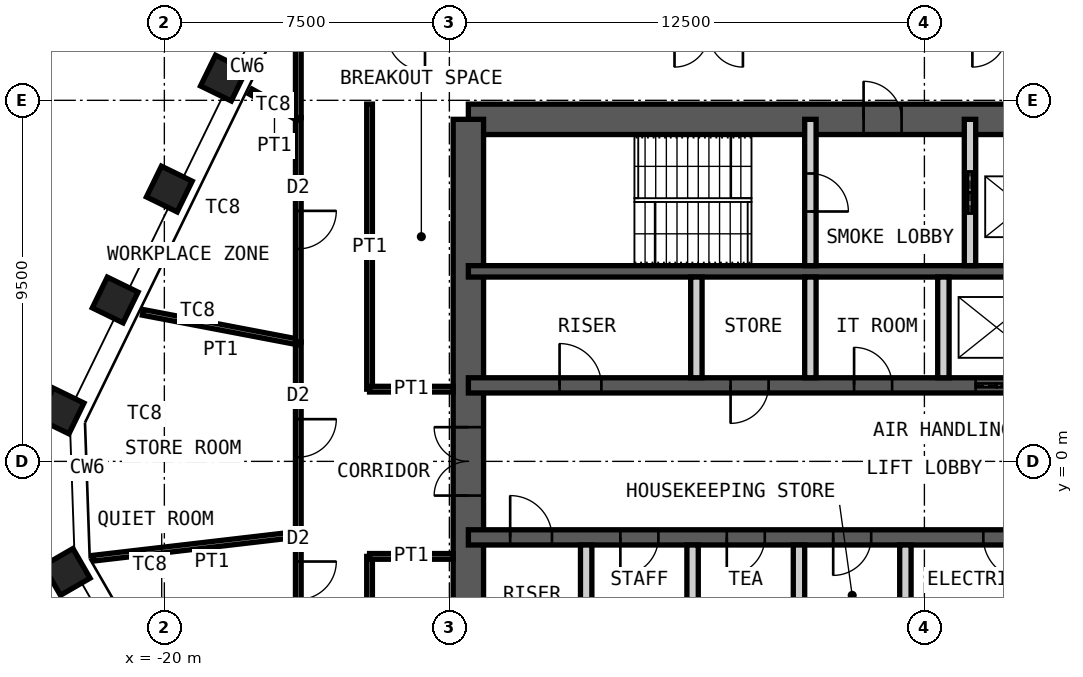
"""IFC4 building model, lengths in metres.
Left out: names, types, materials, properties, quantities, classifications, styles, units other than length and angle.
Written with IfcOpenShell. Run it as: python <this file> out.ifc"""

import sys

from ifc_helpers import new_model, si_unit, direction, frame, frame_2d, origin, origin_2d, place, context, subcontext, project, spatial, rectangle, hollow_rectangle, extrude, element, fill, save


model = new_model("IFC4")
c1 = context("Model", 3, precision=1e-05, world=origin(), true_north=direction((0.0, 1.0)))
c2 = subcontext(c1, "Body", "Model", "MODEL_VIEW")
j1 = project(units=[si_unit("LENGTHUNIT", "METRE"), si_unit("PLANEANGLEUNIT", "RADIAN")], contexts=[c1])
p1 = place(None, origin())
s1 = spatial("IfcSite", under=j1, at=p1, CompositionType="ELEMENT")
p2 = place(p1, origin())
s2 = spatial("IfcBuilding", under=s1, at=p2, CompositionType="ELEMENT")
p3 = place(p2, frame((0.0, 0.0, 325.0)))
s3 = spatial("IfcBuildingStorey", under=s2, at=p3, CompositionType="ELEMENT", Elevation=325.0)
for number, where, z_axis, x_axis in (
    (1, (-22.57, -2.908, 0.0), (0.0, 0.0, 1.0), (0.5, -0.866, 0.0)),
    (2, (-22.717, 1.327, 0.0), (0.0, 0.0, 1.0), (-0.438, -0.899, 0.0)),
    (3, (-21.293, 4.246, 0.0), (0.0, 0.0, 1.0), (-0.438, -0.899, 0.0)),
    (4, (-19.87, 7.166, 0.0), (0.0, 0.0, 1.0), (-0.438, -0.899, 0.0)),
    (5, (-18.446, 10.085, 0.0), (0.0, 0.0, 1.0), (-0.438, -0.899, 0.0)),
):
    element("IfcColumn", number, at=place(p3, frame(where, z_axis=z_axis, x_axis=x_axis)), inside=s3, PredefinedType="COLUMN", context=c2, shape_type="SweptSolid", body=[
        extrude(hollow_rectangle(XDim=0.9, YDim=0.9, WallThickness=0.05, at=origin_2d()), origin(), (0.0, 0.0, 1.0), 4.2),
    ])
p4 = place(p3, frame((-12.0, 9.0, 0.0), z_axis=(0.0, 0.0, 1.0), x_axis=(1.0, 0.0, 0.0)))
e6 = element("IfcWall", 6, at=p4, inside=s3, PredefinedType="SHEAR", context=c2, shape_type="SweptSolid", body=[
    extrude(rectangle(XDim=24.0, YDim=0.8, at=frame_2d((12.0, 0.0))), origin(), (0.0, 0.0, 1.0), 4.2),
])
p5 = place(p4, frame((10.4, 0.0, 0.0)))
e7 = element("IfcOpeningElement", 7, at=p5, cuts=e6, PredefinedType="OPENING", context=c2, shape_type="SweptSolid", body=[
    extrude(rectangle(XDim=1.0, YDim=2.1, at=frame_2d((0.5, 1.05))), frame((0.0, 0.41, 0.0), z_axis=(0.0, -1.0, 0.0), x_axis=(1.0, 0.0, 0.0)), (0.0, 0.0, 1.0), 0.82),
])
p6 = place(p4, frame((17.6, 0.0, 0.0)))
e8 = element("IfcOpeningElement", 8, at=p6, cuts=e6, PredefinedType="OPENING", context=c2, shape_type="SweptSolid", body=[
    extrude(rectangle(XDim=0.9, YDim=2.1, at=frame_2d((0.45, 1.05))), frame((0.0, 0.41, 0.0), z_axis=(0.0, -1.0, 0.0), x_axis=(1.0, 0.0, 0.0)), (0.0, 0.0, 1.0), 0.82),
])
p7 = place(p4, frame((21.9, 0.0, 0.0)))
e9 = element("IfcOpeningElement", 9, at=p7, cuts=e6, PredefinedType="OPENING", context=c2, shape_type="SweptSolid", body=[
    extrude(rectangle(XDim=0.9, YDim=2.1, at=frame_2d((0.45, 1.05))), frame((0.0, 0.41, 0.0), z_axis=(0.0, -1.0, 0.0), x_axis=(1.0, 0.0, 0.0)), (0.0, 0.0, 1.0), 0.82),
])
p8 = place(p3, frame((-12.0, -9.0, 0.0), z_axis=(0.0, 0.0, 1.0), x_axis=(0.0, 1.0, 0.0)))
e10 = element("IfcWall", 10, at=p8, inside=s3, PredefinedType="SHEAR", context=c2, shape_type="SweptSolid", body=[
    extrude(rectangle(XDim=18.0, YDim=0.8, at=frame_2d((9.0, 0.0))), origin(), (0.0, 0.0, 1.0), 4.2),
])
p9 = place(p8, frame((8.1, 0.0, 0.0)))
e11 = element("IfcOpeningElement", 11, at=p9, cuts=e10, PredefinedType="OPENING", context=c2, shape_type="SweptSolid", body=[
    extrude(rectangle(XDim=1.8, YDim=2.1, at=frame_2d((0.9, 1.05))), frame((0.0, 0.41, 0.0), z_axis=(0.0, -1.0, 0.0), x_axis=(1.0, 0.0, 0.0)), (0.0, 0.0, 1.0), 0.82),
])
p10 = place(p3, frame((-12.0, 5.0, 0.0), z_axis=(0.0, 0.0, 1.0), x_axis=(1.0, 0.0, 0.0)))
e12 = element("IfcWall", 12, at=p10, inside=s3, PredefinedType="SHEAR", context=c2, shape_type="SweptSolid", body=[
    extrude(rectangle(XDim=24.0, YDim=0.3, at=frame_2d((12.0, 0.0))), origin(), (0.0, 0.0, 1.0), 4.2),
])
p11 = place(p3, frame((-12.0, 2.0, 0.0), z_axis=(0.0, 0.0, 1.0), x_axis=(1.0, 0.0, 0.0)))
e13 = element("IfcWall", 13, at=p11, inside=s3, PredefinedType="SHEAR", context=c2, shape_type="SweptSolid", body=[
    extrude(rectangle(XDim=24.0, YDim=0.4, at=frame_2d((12.0, 0.0))), origin(), (0.0, 0.0, 1.0), 4.2),
])
p12 = place(p11, frame((2.4, 0.0, 0.0)))
e14 = element("IfcOpeningElement", 14, at=p12, cuts=e13, PredefinedType="OPENING", context=c2, shape_type="SweptSolid", body=[
    extrude(rectangle(XDim=1.1, YDim=2.1, at=frame_2d((0.55, 1.05))), frame((0.0, 0.21, 0.0), z_axis=(0.0, -1.0, 0.0), x_axis=(1.0, 0.0, 0.0)), (0.0, 0.0, 1.0), 0.42),
])
p13 = place(p11, frame((22.0, 0.0, 0.0)))
e15 = element("IfcOpeningElement", 15, at=p13, cuts=e13, PredefinedType="OPENING", context=c2, shape_type="SweptSolid", body=[
    extrude(rectangle(XDim=1.1, YDim=2.1, at=frame_2d((0.55, 1.05))), frame((0.0, 0.21, 0.0), z_axis=(0.0, -1.0, 0.0), x_axis=(1.0, 0.0, 0.0)), (0.0, 0.0, 1.0), 0.42),
])
p14 = place(p11, frame((10.15, 0.0, 0.0)))
e16 = element("IfcOpeningElement", 16, at=p14, cuts=e13, PredefinedType="OPENING", context=c2, shape_type="SweptSolid", body=[
    extrude(rectangle(XDim=1.0, YDim=2.1, at=frame_2d((0.5, 1.05))), frame((0.0, 0.21, 0.0), z_axis=(0.0, -1.0, 0.0), x_axis=(1.0, 0.0, 0.0)), (0.0, 0.0, 1.0), 0.42),
])
p15 = place(p11, frame((6.9, 0.0, 0.0)))
e17 = element("IfcOpeningElement", 17, at=p15, cuts=e13, PredefinedType="OPENING", context=c2, shape_type="SweptSolid", body=[
    extrude(rectangle(XDim=1.0, YDim=2.1, at=frame_2d((0.5, 1.05))), frame((0.0, 0.21, 0.0), z_axis=(0.0, -1.0, 0.0), x_axis=(1.0, 0.0, 0.0)), (0.0, 0.0, 1.0), 0.42),
])
p16 = place(p11, frame((13.35, 0.0, 0.0)))
e18 = element("IfcOpeningElement", 18, at=p16, cuts=e13, PredefinedType="OPENING", context=c2, shape_type="SweptSolid", body=[
    extrude(rectangle(XDim=1.1, YDim=2.4, at=frame_2d((0.55, 1.2))), frame((0.0, 0.21, 0.0), z_axis=(0.0, -1.0, 0.0), x_axis=(1.0, 0.0, 0.0)), (0.0, 0.0, 1.0), 0.42),
])
p17 = place(p11, frame((16.15, 0.0, 0.0)))
e19 = element("IfcOpeningElement", 19, at=p17, cuts=e13, PredefinedType="OPENING", context=c2, shape_type="SweptSolid", body=[
    extrude(rectangle(XDim=1.1, YDim=2.4, at=frame_2d((0.55, 1.2))), frame((0.0, 0.21, 0.0), z_axis=(0.0, -1.0, 0.0), x_axis=(1.0, 0.0, 0.0)), (0.0, 0.0, 1.0), 0.42),
])
p18 = place(p11, frame((19.0, 0.0, 0.0)))
e20 = element("IfcOpeningElement", 20, at=p18, cuts=e13, PredefinedType="OPENING", context=c2, shape_type="SweptSolid", body=[
    extrude(rectangle(XDim=1.0, YDim=2.1, at=frame_2d((0.5, 1.05))), frame((0.0, 0.21, 0.0), z_axis=(0.0, -1.0, 0.0), x_axis=(1.0, 0.0, 0.0)), (0.0, 0.0, 1.0), 0.42),
])
p19 = place(p3, frame((-12.0, -2.0, 0.0), z_axis=(0.0, 0.0, 1.0), x_axis=(1.0, 0.0, 0.0)))
e21 = element("IfcWall", 21, at=p19, inside=s3, PredefinedType="SHEAR", context=c2, shape_type="SweptSolid", body=[
    extrude(rectangle(XDim=24.0, YDim=0.4, at=frame_2d((12.0, 0.0))), origin(), (0.0, 0.0, 1.0), 4.2),
])
p20 = place(p19, frame((1.1, 0.0, 0.0)))
e22 = element("IfcOpeningElement", 22, at=p20, cuts=e21, PredefinedType="OPENING", context=c2, shape_type="SweptSolid", body=[
    extrude(rectangle(XDim=1.1, YDim=2.1, at=frame_2d((0.55, 1.05))), frame((0.0, 0.21, 0.0), z_axis=(0.0, -1.0, 0.0), x_axis=(1.0, 0.0, 0.0)), (0.0, 0.0, 1.0), 0.42),
])
p21 = place(p19, frame((13.55, 0.0, 0.0)))
e23 = element("IfcOpeningElement", 23, at=p21, cuts=e21, PredefinedType="OPENING", context=c2, shape_type="SweptSolid", body=[
    extrude(rectangle(XDim=1.1, YDim=2.1, at=frame_2d((0.55, 1.05))), frame((0.0, 0.21, 0.0), z_axis=(0.0, -1.0, 0.0), x_axis=(1.0, 0.0, 0.0)), (0.0, 0.0, 1.0), 0.42),
])
p22 = place(p19, frame((20.7, 0.0, 0.0)))
e24 = element("IfcOpeningElement", 24, at=p22, cuts=e21, PredefinedType="OPENING", context=c2, shape_type="SweptSolid", body=[
    extrude(rectangle(XDim=1.1, YDim=2.1, at=frame_2d((0.55, 1.05))), frame((0.0, 0.21, 0.0), z_axis=(0.0, -1.0, 0.0), x_axis=(1.0, 0.0, 0.0)), (0.0, 0.0, 1.0), 0.42),
])
p23 = place(p19, frame((4.0, 0.0, 0.0)))
e25 = element("IfcOpeningElement", 25, at=p23, cuts=e21, PredefinedType="OPENING", context=c2, shape_type="SweptSolid", body=[
    extrude(rectangle(XDim=1.0, YDim=2.1, at=frame_2d((0.5, 1.05))), frame((0.0, 0.21, 0.0), z_axis=(0.0, -1.0, 0.0), x_axis=(1.0, 0.0, 0.0)), (0.0, 0.0, 1.0), 0.42),
])
p24 = place(p19, frame((6.8, 0.0, 0.0)))
e26 = element("IfcOpeningElement", 26, at=p24, cuts=e21, PredefinedType="OPENING", context=c2, shape_type="SweptSolid", body=[
    extrude(rectangle(XDim=1.0, YDim=2.1, at=frame_2d((0.5, 1.05))), frame((0.0, 0.21, 0.0), z_axis=(0.0, -1.0, 0.0), x_axis=(1.0, 0.0, 0.0)), (0.0, 0.0, 1.0), 0.42),
])
p25 = place(p19, frame((9.6, 0.0, 0.0)))
e27 = element("IfcOpeningElement", 27, at=p25, cuts=e21, PredefinedType="OPENING", context=c2, shape_type="SweptSolid", body=[
    extrude(rectangle(XDim=1.0, YDim=2.1, at=frame_2d((0.5, 1.05))), frame((0.0, 0.21, 0.0), z_axis=(0.0, -1.0, 0.0), x_axis=(1.0, 0.0, 0.0)), (0.0, 0.0, 1.0), 0.42),
])
p26 = place(p3, frame((-3.0, 5.15, 0.0), z_axis=(0.0, 0.0, 1.0), x_axis=(0.0, 1.0, 0.0)))
e28 = element("IfcWall", 28, at=p26, inside=s3, PredefinedType="PARTITIONING", context=c2, shape_type="SweptSolid", body=[
    extrude(rectangle(XDim=3.85, YDim=0.3, at=frame_2d((1.925, 0.0))), origin(), (0.0, 0.0, 1.0), 3.98),
])
p27 = place(p26, frame((1.425, 0.0, 0.0)))
e29 = element("IfcOpeningElement", 29, at=p27, cuts=e28, PredefinedType="OPENING", context=c2, shape_type="SweptSolid", body=[
    extrude(rectangle(XDim=1.0, YDim=2.1, at=frame_2d((0.5, 1.05))), frame((0.0, 0.16, 0.0), z_axis=(0.0, -1.0, 0.0), x_axis=(1.0, 0.0, 0.0)), (0.0, 0.0, 1.0), 0.32),
])
p28 = place(p3, frame((1.2, 5.15, 0.0), z_axis=(0.0, 0.0, 1.0), x_axis=(0.0, 1.0, 0.0)))
e30 = element("IfcWall", 30, at=p28, inside=s3, PredefinedType="PARTITIONING", context=c2, shape_type="SweptSolid", body=[
    extrude(rectangle(XDim=3.85, YDim=0.3, at=frame_2d((1.925, 0.0))), origin(), (0.0, 0.0, 1.0), 3.98),
])
p29 = place(p28, frame((1.375, 0.0, 0.0)))
e31 = element("IfcOpeningElement", 31, at=p29, cuts=e30, PredefinedType="OPENING", context=c2, shape_type="SweptSolid", body=[
    extrude(rectangle(XDim=1.1, YDim=2.4, at=frame_2d((0.55, 1.2))), frame((0.0, 0.16, 0.0), z_axis=(0.0, -1.0, 0.0), x_axis=(1.0, 0.0, 0.0)), (0.0, 0.0, 1.0), 0.32),
])
for number, where, z_axis, x_axis in (
    (32, (-6.0, 2.2, 0.0), (0.0, 0.0, 1.0), (0.0, 1.0, 0.0)),
    (33, (-3.0, 2.2, 0.0), (0.0, 0.0, 1.0), (0.0, 1.0, 0.0)),
    (34, (0.5, 2.2, 0.0), (0.0, 0.0, 1.0), (0.0, 1.0, 0.0)),
    (35, (-8.9, -4.85, 0.0), (0.0, 0.0, 1.0), (0.0, 1.0, 0.0)),
    (36, (-6.1, -4.85, 0.0), (0.0, 0.0, 1.0), (0.0, 1.0, 0.0)),
    (37, (-3.3, -4.85, 0.0), (0.0, 0.0, 1.0), (0.0, 1.0, 0.0)),
    (38, (-0.5, -4.85, 0.0), (0.0, 0.0, 1.0), (0.0, 1.0, 0.0)),
):
    element("IfcWall", number, at=place(p3, frame(where, z_axis=z_axis, x_axis=x_axis)), inside=s3, PredefinedType="PARTITIONING", context=c2, shape_type="SweptSolid", body=[
        extrude(rectangle(XDim=2.65, YDim=0.3, at=frame_2d((1.325, 0.0))), origin(), (0.0, 0.0, 1.0), 3.98),
    ])
p30 = place(p3, frame((-16.475, -4.351, 0.0), z_axis=(0.0, 0.0, 1.0), x_axis=(0.0, 1.0, 0.0)))
e39 = element("IfcWall", 39, at=p30, inside=s3, PredefinedType="PARTITIONING", context=c2, shape_type="SweptSolid", body=[
    extrude(rectangle(XDim=2.432, YDim=0.15, at=frame_2d((1.216, 0.0))), origin(), (0.0, 0.0, 1.0), 4.03),
])
p31 = place(p30, frame((0.716, 0.0, 0.0)))
e40 = element("IfcOpeningElement", 40, at=p31, cuts=e39, PredefinedType="OPENING", context=c2, shape_type="SweptSolid", body=[
    extrude(rectangle(XDim=1.0, YDim=2.4, at=frame_2d((0.5, 1.2))), frame((0.0, 0.085, 0.0), z_axis=(0.0, -1.0, 0.0), x_axis=(1.0, 0.0, 0.0)), (0.0, 0.0, 1.0), 0.17),
])
p32 = place(p3, frame((-21.864, -2.547, 0.0), z_axis=(0.0, 0.0, 1.0), x_axis=(0.993284789299, 0.115694975458, 0.0)))
e41 = element("IfcWall", 41, at=p32, inside=s3, PredefinedType="PARTITIONING", context=c2, shape_type="SweptSolid", body=[
    extrude(rectangle(XDim=5.425, YDim=0.15, at=frame_2d((2.713, 0.0))), origin(), (0.0, 0.0, 1.0), 2.93),
])
p33 = place(p3, frame((-16.475, -1.919, 0.0), z_axis=(0.0, 0.0, 1.0), x_axis=(0.0, 1.0, 0.0)))
e42 = element("IfcWall", 42, at=p33, inside=s3, PredefinedType="PARTITIONING", context=c2, shape_type="SweptSolid", body=[
    extrude(rectangle(XDim=5.06, YDim=0.15, at=frame_2d((2.53, 0.0))), origin(), (0.0, 0.0, 1.0), 4.03),
])
p34 = place(p33, frame((2.03, 0.0, 0.0)))
e43 = element("IfcOpeningElement", 43, at=p34, cuts=e42, PredefinedType="OPENING", context=c2, shape_type="SweptSolid", body=[
    extrude(rectangle(XDim=1.0, YDim=2.4, at=frame_2d((0.5, 1.2))), frame((0.0, 0.085, 0.0), z_axis=(0.0, -1.0, 0.0), x_axis=(1.0, 0.0, 0.0)), (0.0, 0.0, 1.0), 0.17),
])
p35 = place(p3, frame((-20.566, 3.921, 0.0), z_axis=(0.0, 0.0, 1.0), x_axis=(0.982304172816, -0.187292584123, 0.0)))
e44 = element("IfcWall", 44, at=p35, inside=s3, PredefinedType="PARTITIONING", context=c2, shape_type="SweptSolid", body=[
    extrude(rectangle(XDim=4.165, YDim=0.15, at=frame_2d((2.083, 0.0))), origin(), (0.0, 0.0, 1.0), 3.33),
])
p36 = place(p3, frame((-16.475, 3.141, 0.0), z_axis=(0.0, 0.0, 1.0), x_axis=(0.0, 1.0, 0.0)))
e45 = element("IfcWall", 45, at=p36, inside=s3, PredefinedType="PARTITIONING", context=c2, shape_type="SweptSolid", body=[
    extrude(rectangle(XDim=5.901, YDim=0.15, at=frame_2d((2.95, 0.0))), origin(), (0.0, 0.0, 1.0), 4.03),
])
p37 = place(p36, frame((2.45, 0.0, 0.0)))
e46 = element("IfcOpeningElement", 46, at=p37, cuts=e45, PredefinedType="OPENING", context=c2, shape_type="SweptSolid", body=[
    extrude(rectangle(XDim=1.0, YDim=2.4, at=frame_2d((0.5, 1.2))), frame((0.0, 0.085, 0.0), z_axis=(0.0, -1.0, 0.0), x_axis=(1.0, 0.0, 0.0)), (0.0, 0.0, 1.0), 0.17),
])
p38 = place(p3, frame((-17.729, 9.73, 0.0), z_axis=(0.0, 0.0, 1.0), x_axis=(0.876633607687, -0.481158516369, 0.0)))
e47 = element("IfcWall", 47, at=p38, inside=s3, PredefinedType="PARTITIONING", context=c2, shape_type="SweptSolid", body=[
    extrude(rectangle(XDim=1.43, YDim=0.15, at=frame_2d((0.715, 0.0))), origin(), (0.0, 0.0, 1.0), 3.33),
])
p39 = place(p3, frame((-16.475, 9.042, 0.0), z_axis=(0.0, 0.0, 1.0), x_axis=(0.0, 1.0, 0.0)))
e48 = element("IfcWall", 48, at=p39, inside=s3, PredefinedType="PARTITIONING", context=c2, shape_type="SweptSolid", body=[
    extrude(rectangle(XDim=2.233, YDim=0.15, at=frame_2d((1.117, 0.0))), origin(), (0.0, 0.0, 1.0), 4.03),
])
p40 = place(p3, frame((-14.6, 1.9, 0.0), z_axis=(0.0, 0.0, 1.0), x_axis=(0.0, 1.0, 0.0)))
e49 = element("IfcWall", 49, at=p40, inside=s3, PredefinedType="PARTITIONING", context=c2, shape_type="SweptSolid", body=[
    extrude(rectangle(XDim=7.5, YDim=0.15, at=frame_2d((3.75, 0.0))), origin(), (0.0, 0.0, 1.0), 4.03),
])
p41 = place(p3, frame((-12.4, 1.9, 0.0), z_axis=(0.0, 0.0, 1.0), x_axis=(-1.0, 0.0, 0.0)))
e50 = element("IfcWall", 50, at=p41, inside=s3, PredefinedType="PARTITIONING", context=c2, shape_type="SweptSolid", body=[
    extrude(rectangle(XDim=2.2, YDim=0.15, at=frame_2d((1.1, 0.0))), origin(), (0.0, 0.0, 1.0), 3.53),
])
p42 = place(p3, frame((-14.6, -9.4, 0.0), z_axis=(0.0, 0.0, 1.0), x_axis=(0.0, 1.0, 0.0)))
e51 = element("IfcWall", 51, at=p42, inside=s3, PredefinedType="PARTITIONING", context=c2, shape_type="SweptSolid", body=[
    extrude(rectangle(XDim=6.9, YDim=0.15, at=frame_2d((3.45, 0.0))), origin(), (0.0, 0.0, 1.0), 4.03),
])
p43 = place(p3, frame((-12.4, -2.5, 0.0), z_axis=(0.0, 0.0, 1.0), x_axis=(-1.0, 0.0, 0.0)))
e52 = element("IfcWall", 52, at=p43, inside=s3, PredefinedType="PARTITIONING", context=c2, shape_type="SweptSolid", body=[
    extrude(rectangle(XDim=2.2, YDim=0.15, at=frame_2d((1.1, 0.0))), origin(), (0.0, 0.0, 1.0), 3.53),
])
p44 = place(p5, origin())
e53 = element("IfcDoor", 53, at=p44, inside=s3, OperationType="SINGLE_SWING_RIGHT", PredefinedType="DOOR", context=c2, shape_type="SweptSolid", body=[
    extrude(rectangle(XDim=1.0, YDim=2.1, at=frame_2d((0.5, 1.05))), frame((0.0, 0.025, 0.0), z_axis=(0.0, -1.0, 0.0), x_axis=(1.0, 0.0, 0.0)), (0.0, 0.0, 1.0), 0.05),
])
fill(e7, e53)
p45 = place(p27, origin())
e54 = element("IfcDoor", 54, at=p45, inside=s3, OperationType="SINGLE_SWING_LEFT", PredefinedType="DOOR", context=c2, shape_type="SweptSolid", body=[
    extrude(rectangle(XDim=1.0, YDim=2.1, at=frame_2d((0.5, 1.05))), frame((0.0, 0.025, 0.0), z_axis=(0.0, -1.0, 0.0), x_axis=(1.0, 0.0, 0.0)), (0.0, 0.0, 1.0), 0.05),
])
fill(e29, e54)
p46 = place(p12, origin())
e55 = element("IfcDoor", 55, at=p46, inside=s3, OperationType="SINGLE_SWING_RIGHT", PredefinedType="DOOR", context=c2, shape_type="SweptSolid", body=[
    extrude(rectangle(XDim=1.1, YDim=2.1, at=frame_2d((0.55, 1.05))), frame((0.0, 0.025, 0.0), z_axis=(0.0, -1.0, 0.0), x_axis=(1.0, 0.0, 0.0)), (0.0, 0.0, 1.0), 0.05),
])
fill(e14, e55)
p47 = place(p20, origin())
e56 = element("IfcDoor", 56, at=p47, inside=s3, OperationType="SINGLE_SWING_RIGHT", PredefinedType="DOOR", context=c2, shape_type="SweptSolid", body=[
    extrude(rectangle(XDim=1.1, YDim=2.1, at=frame_2d((0.55, 1.05))), frame((0.0, 0.025, 0.0), z_axis=(0.0, -1.0, 0.0), x_axis=(1.0, 0.0, 0.0)), (0.0, 0.0, 1.0), 0.05),
])
fill(e22, e56)
p48 = place(p14, origin())
e57 = element("IfcDoor", 57, at=p48, inside=s3, OperationType="SINGLE_SWING_RIGHT", PredefinedType="DOOR", context=c2, shape_type="SweptSolid", body=[
    extrude(rectangle(XDim=1.0, YDim=2.1, at=frame_2d((0.5, 1.05))), frame((0.0, 0.025, 0.0), z_axis=(0.0, -1.0, 0.0), x_axis=(1.0, 0.0, 0.0)), (0.0, 0.0, 1.0), 0.05),
])
fill(e16, e57)
p49 = place(p21, origin())
e58 = element("IfcDoor", 58, at=p49, inside=s3, OperationType="SINGLE_SWING_RIGHT", PredefinedType="DOOR", context=c2, shape_type="SweptSolid", body=[
    extrude(rectangle(XDim=1.1, YDim=2.1, at=frame_2d((0.55, 1.05))), frame((0.0, 0.025, 0.0), z_axis=(0.0, -1.0, 0.0), x_axis=(1.0, 0.0, 0.0)), (0.0, 0.0, 1.0), 0.05),
])
fill(e23, e58)
p50 = place(p9, origin())
e59 = element("IfcDoor", 59, at=p50, inside=s3, OperationType="DOUBLE_DOOR_DOUBLE_SWING", PredefinedType="DOOR", context=c2, shape_type="SweptSolid", body=[
    extrude(rectangle(XDim=1.8, YDim=2.1, at=frame_2d((0.9, 1.05))), frame((0.0, 0.025, 0.0), z_axis=(0.0, -1.0, 0.0), x_axis=(1.0, 0.0, 0.0)), (0.0, 0.0, 1.0), 0.05),
])
fill(e11, e59)
p51 = place(p29, origin())
e60 = element("IfcDoor", 60, at=p51, inside=s3, OperationType="DOUBLE_DOOR_SLIDING", PredefinedType="DOOR", context=c2, shape_type="SweptSolid", body=[
    extrude(rectangle(XDim=1.1, YDim=2.4, at=frame_2d((0.55, 1.2))), frame((0.0, 0.025, 0.0), z_axis=(0.0, -1.0, 0.0), x_axis=(1.0, 0.0, 0.0)), (0.0, 0.0, 1.0), 0.05),
])
fill(e31, e60)
p52 = place(p15, origin())
e61 = element("IfcDoor", 61, at=p52, inside=s3, OperationType="SINGLE_SWING_LEFT", PredefinedType="DOOR", context=c2, shape_type="SweptSolid", body=[
    extrude(rectangle(XDim=1.0, YDim=2.1, at=frame_2d((0.5, 1.05))), frame((0.0, 0.025, 0.0), z_axis=(0.0, -1.0, 0.0), x_axis=(1.0, 0.0, 0.0)), (0.0, 0.0, 1.0), 0.05),
])
fill(e17, e61)
p53 = place(p16, origin())
e62 = element("IfcDoor", 62, at=p53, inside=s3, OperationType="DOUBLE_DOOR_SLIDING", PredefinedType="DOOR", context=c2, shape_type="SweptSolid", body=[
    extrude(rectangle(XDim=1.1, YDim=2.4, at=frame_2d((0.55, 1.2))), frame((0.0, 0.025, 0.0), z_axis=(0.0, -1.0, 0.0), x_axis=(1.0, 0.0, 0.0)), (0.0, 0.0, 1.0), 0.05),
])
fill(e18, e62)
p54 = place(p23, origin())
e63 = element("IfcDoor", 63, at=p54, inside=s3, OperationType="SINGLE_SWING_LEFT", PredefinedType="DOOR", context=c2, shape_type="SweptSolid", body=[
    extrude(rectangle(XDim=1.0, YDim=2.1, at=frame_2d((0.5, 1.05))), frame((0.0, 0.025, 0.0), z_axis=(0.0, -1.0, 0.0), x_axis=(1.0, 0.0, 0.0)), (0.0, 0.0, 1.0), 0.05),
])
fill(e25, e63)
p55 = place(p24, origin())
e64 = element("IfcDoor", 64, at=p55, inside=s3, OperationType="SINGLE_SWING_LEFT", PredefinedType="DOOR", context=c2, shape_type="SweptSolid", body=[
    extrude(rectangle(XDim=1.0, YDim=2.1, at=frame_2d((0.5, 1.05))), frame((0.0, 0.025, 0.0), z_axis=(0.0, -1.0, 0.0), x_axis=(1.0, 0.0, 0.0)), (0.0, 0.0, 1.0), 0.05),
])
fill(e26, e64)
p56 = place(p25, origin())
e65 = element("IfcDoor", 65, at=p56, inside=s3, OperationType="SINGLE_SWING_LEFT", PredefinedType="DOOR", context=c2, shape_type="SweptSolid", body=[
    extrude(rectangle(XDim=1.0, YDim=2.1, at=frame_2d((0.5, 1.05))), frame((0.0, 0.025, 0.0), z_axis=(0.0, -1.0, 0.0), x_axis=(1.0, 0.0, 0.0)), (0.0, 0.0, 1.0), 0.05),
])
fill(e27, e65)
p57 = place(p31, origin())
e66 = element("IfcDoor", 66, at=p57, inside=s3, OperationType="SINGLE_SWING_RIGHT", PredefinedType="DOOR", context=c2, shape_type="SweptSolid", body=[
    extrude(rectangle(XDim=1.0, YDim=2.4, at=frame_2d((0.5, 1.2))), frame((0.0, 0.025, 0.0), z_axis=(0.0, -1.0, 0.0), x_axis=(1.0, 0.0, 0.0)), (0.0, 0.0, 1.0), 0.05),
])
fill(e40, e66)
p58 = place(p34, origin())
e67 = element("IfcDoor", 67, at=p58, inside=s3, OperationType="SINGLE_SWING_RIGHT", PredefinedType="DOOR", context=c2, shape_type="SweptSolid", body=[
    extrude(rectangle(XDim=1.0, YDim=2.4, at=frame_2d((0.5, 1.2))), frame((0.0, 0.025, 0.0), z_axis=(0.0, -1.0, 0.0), x_axis=(1.0, 0.0, 0.0)), (0.0, 0.0, 1.0), 0.05),
])
fill(e43, e67)
p59 = place(p37, origin())
e68 = element("IfcDoor", 68, at=p59, inside=s3, OperationType="SINGLE_SWING_RIGHT", PredefinedType="DOOR", context=c2, shape_type="SweptSolid", body=[
    extrude(rectangle(XDim=1.0, YDim=2.4, at=frame_2d((0.5, 1.2))), frame((0.0, 0.025, 0.0), z_axis=(0.0, -1.0, 0.0), x_axis=(1.0, 0.0, 0.0)), (0.0, 0.0, 1.0), 0.05),
])
fill(e46, e68)
save(model, sys.argv[1])
